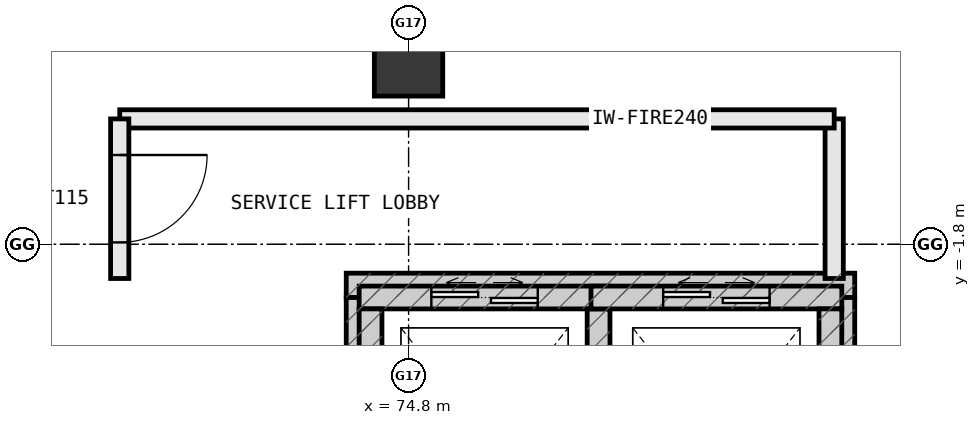
"""IFC4 building model, lengths in metres.
Left out: names, types, materials, properties, quantities, classifications, styles, units other than length and angle.
Written with IfcOpenShell. Run it as: python <this file> out.ifc"""

import sys

from ifc_helpers import new_model, si_unit, direction, frame, frame_2d, origin, origin_2d, place, context, subcontext, project, spatial, rectangle, extrude, element, fill, save


model = new_model("IFC4")
c1 = context("Model", 3, precision=1e-05, world=origin(), true_north=direction((0.0, 1.0)))
c2 = subcontext(c1, "Body", "Model", "MODEL_VIEW")
j1 = project(units=[si_unit("LENGTHUNIT", "METRE"), si_unit("PLANEANGLEUNIT", "RADIAN")], contexts=[c1])
p1 = place(None, origin())
s1 = spatial("IfcSite", under=j1, at=p1, CompositionType="ELEMENT")
p2 = place(p1, origin())
s2 = spatial("IfcBuilding", under=s1, at=p2, CompositionType="ELEMENT")
p3 = place(p2, frame((0.0, 0.0, -4.5)))
s3 = spatial("IfcBuildingStorey", under=s2, at=p3, CompositionType="ELEMENT", Elevation=-4.5)
p4 = place(p3, frame((74.8, 0.6, 0.0), z_axis=(0.0, 0.0, 1.0), x_axis=(1.0, 0.0, 0.0)))
e1 = element("IfcColumn", 1, at=p4, inside=s3, PredefinedType="COLUMN", context=c2, shape_type="SweptSolid", body=[
    extrude(rectangle(XDim=0.9, YDim=0.9, at=origin_2d()), origin(), (0.0, 0.0, 1.0), 4.5),
])
p5 = place(p3, frame((80.67, -2.34, -1.18), z_axis=(0.0, 0.0, 1.0), x_axis=(-1.0, 0.0, 0.0)))
e2 = element("IfcWall", 2, at=p5, inside=s3, PredefinedType="SHEAR", context=c2, shape_type="SweptSolid", body=[
    extrude(rectangle(XDim=6.69, YDim=0.32, at=frame_2d((3.345, 0.0))), origin(), (0.0, 0.0, 1.0), 1.18),
])
for number, where, z_axis, x_axis in (
    (3, (80.51, -6.1, -1.18), (0.0, 0.0, 1.0), (0.0, 1.0, 0.0)),
    (4, (74.14, -2.5, -1.18), (0.0, 0.0, 1.0), (0.0, -1.0, 0.0)),
):
    element("IfcWall", number, at=place(p3, frame(where, z_axis=z_axis, x_axis=x_axis)), inside=s3, PredefinedType="SHEAR", context=c2, shape_type="SweptSolid", body=[
        extrude(rectangle(XDim=3.6, YDim=0.32, at=frame_2d((1.8, 0.0))), origin(), (0.0, 0.0, 1.0), 1.18),
    ])
p6 = place(p3, frame((77.45, -2.5, 0.0), z_axis=(0.0, 0.0, 1.0), x_axis=(-1.0, 0.0, 0.0)))
e5 = element("IfcWall", 5, at=p6, inside=s3, PredefinedType="SHEAR", context=c2, shape_type="SweptSolid", body=[
    extrude(rectangle(XDim=3.3, YDim=0.3, at=frame_2d((1.65, 0.0))), origin(), (0.0, 0.0, 1.0), 4.5),
])
p7 = place(p6, frame((0.95, 0.0, 0.0)))
e6 = element("IfcOpeningElement", 6, at=p7, cuts=e5, PredefinedType="OPENING", context=c2, shape_type="SweptSolid", body=[
    extrude(rectangle(XDim=1.4, YDim=2.2, at=frame_2d((0.7, 1.1))), frame((0.0, 0.162, 0.0), z_axis=(0.0, -1.0, 0.0), x_axis=(1.0, 0.0, 0.0)), (0.0, 0.0, 1.0), 0.324),
])
for number, where, z_axis, x_axis in (
    (7, (77.3, -5.95, 0.0), (0.0, 0.0, 1.0), (0.0, 1.0, 0.0)),
    (8, (74.3, -2.65, 0.0), (0.0, 0.0, 1.0), (0.0, -1.0, 0.0)),
):
    element("IfcWall", number, at=place(p3, frame(where, z_axis=z_axis, x_axis=x_axis)), inside=s3, PredefinedType="SHEAR", context=c2, shape_type="SweptSolid", body=[
        extrude(rectangle(XDim=3.3, YDim=0.3, at=frame_2d((1.65, 0.0))), origin(), (0.0, 0.0, 1.0), 4.5),
    ])
p8 = place(p3, frame((80.5, -2.5, 0.0), z_axis=(0.0, 0.0, 1.0), x_axis=(-1.0, 0.0, 0.0)))
e9 = element("IfcWall", 9, at=p8, inside=s3, PredefinedType="SHEAR", context=c2, shape_type="SweptSolid", body=[
    extrude(rectangle(XDim=3.3, YDim=0.3, at=frame_2d((1.65, 0.0))), origin(), (0.0, 0.0, 1.0), 4.5),
])
p9 = place(p8, frame((0.95, 0.0, 0.0)))
e10 = element("IfcOpeningElement", 10, at=p9, cuts=e9, PredefinedType="OPENING", context=c2, shape_type="SweptSolid", body=[
    extrude(rectangle(XDim=1.4, YDim=2.2, at=frame_2d((0.7, 1.1))), frame((0.0, 0.162, 0.0), z_axis=(0.0, -1.0, 0.0), x_axis=(1.0, 0.0, 0.0)), (0.0, 0.0, 1.0), 0.324),
])
p10 = place(p3, frame((80.35, -5.95, 0.0), z_axis=(0.0, 0.0, 1.0), x_axis=(0.0, 1.0, 0.0)))
e11 = element("IfcWall", 11, at=p10, inside=s3, PredefinedType="SHEAR", context=c2, shape_type="SweptSolid", body=[
    extrude(rectangle(XDim=3.3, YDim=0.3, at=frame_2d((1.65, 0.0))), origin(), (0.0, 0.0, 1.0), 4.5),
])
p11 = place(p3, frame((80.4, -2.25, 0.0), z_axis=(0.0, 0.0, 1.0), x_axis=(0.0, 1.0, 0.0)))
e12 = element("IfcWall", 12, at=p11, inside=s3, PredefinedType="STANDARD", context=c2, shape_type="SweptSolid", body=[
    extrude(rectangle(XDim=2.1, YDim=0.24, at=frame_2d((1.05, 0.0))), origin(), (0.0, 0.0, 1.0), 4.2),
])
p12 = place(p3, frame((80.4, -0.15, 0.0), z_axis=(0.0, 0.0, 1.0), x_axis=(-1.0, 0.0, 0.0)))
e13 = element("IfcWall", 13, at=p12, inside=s3, PredefinedType="STANDARD", context=c2, shape_type="SweptSolid", body=[
    extrude(rectangle(XDim=9.4, YDim=0.24, at=frame_2d((4.7, 0.0))), origin(), (0.0, 0.0, 1.0), 4.2),
])
p13 = place(p3, frame((71.0, -0.15, 0.0), z_axis=(0.0, 0.0, 1.0), x_axis=(0.0, -1.0, 0.0)))
e14 = element("IfcWall", 14, at=p13, inside=s3, PredefinedType="STANDARD", context=c2, shape_type="SweptSolid", body=[
    extrude(rectangle(XDim=2.1, YDim=0.24, at=frame_2d((1.05, 0.0))), origin(), (0.0, 0.0, 1.0), 4.2),
])
p14 = place(p13, frame((0.475, 0.0, 0.0)))
e15 = element("IfcOpeningElement", 15, at=p14, cuts=e14, PredefinedType="OPENING", context=c2, shape_type="SweptSolid", body=[
    extrude(rectangle(XDim=1.15, YDim=2.2, at=frame_2d((0.575, 1.1))), frame((0.0, 0.132, 0.0), z_axis=(0.0, -1.0, 0.0), x_axis=(1.0, 0.0, 0.0)), (0.0, 0.0, 1.0), 0.264),
])
p15 = place(p7, origin())
e16 = element("IfcDoor", 16, at=p15, inside=s3, OperationType="DOUBLE_DOOR_SLIDING", PredefinedType="DOOR", context=c2, shape_type="SweptSolid", body=[
    extrude(rectangle(XDim=1.4, YDim=2.2, at=frame_2d((0.7, 1.1))), frame((0.0, 0.025, 0.0), z_axis=(0.0, -1.0, 0.0), x_axis=(1.0, 0.0, 0.0)), (0.0, 0.0, 1.0), 0.05),
])
fill(e6, e16)
p16 = place(p9, origin())
e17 = element("IfcDoor", 17, at=p16, inside=s3, OperationType="DOUBLE_DOOR_SLIDING", PredefinedType="DOOR", context=c2, shape_type="SweptSolid", body=[
    extrude(rectangle(XDim=1.4, YDim=2.2, at=frame_2d((0.7, 1.1))), frame((0.0, 0.025, 0.0), z_axis=(0.0, -1.0, 0.0), x_axis=(1.0, 0.0, 0.0)), (0.0, 0.0, 1.0), 0.05),
])
fill(e10, e17)
p17 = place(p14, origin())
e18 = element("IfcDoor", 18, at=p17, inside=s3, OperationType="SINGLE_SWING_LEFT", PredefinedType="DOOR", context=c2, shape_type="SweptSolid", body=[
    extrude(rectangle(XDim=1.15, YDim=2.2, at=frame_2d((0.575, 1.1))), frame((0.0, 0.025, 0.0), z_axis=(0.0, -1.0, 0.0), x_axis=(1.0, 0.0, 0.0)), (0.0, 0.0, 1.0), 0.05),
])
fill(e15, e18)
save(model, sys.argv[1])
